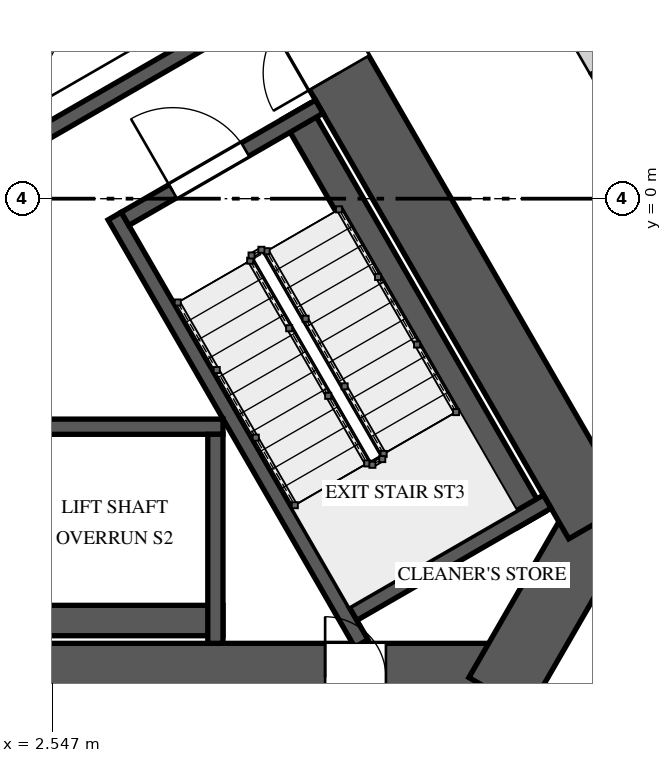
"""IFC4 building model, lengths in metres.
Left out: names, types, materials, properties, quantities, classifications, styles, units other than length and angle.
Written with IfcOpenShell. Run it as: python <this file> out.ifc"""

import sys

from ifc_helpers import new_model, si_unit, direction, frame, frame_2d, origin, place, context, subcontext, project, spatial, rectangle, extrude, element, fill, save


model = new_model("IFC4")
c1 = context("Model", 3, precision=1e-05, world=origin(), true_north=direction((0.0, 1.0)))
c2 = subcontext(c1, "Body", "Model", "MODEL_VIEW")
j1 = project(units=[si_unit("LENGTHUNIT", "METRE"), si_unit("PLANEANGLEUNIT", "RADIAN")], contexts=[c1])
p1 = place(None, origin())
s1 = spatial("IfcSite", under=j1, at=p1, CompositionType="ELEMENT")
p2 = place(p1, origin())
s2 = spatial("IfcBuilding", under=s1, at=p2, CompositionType="ELEMENT")
p3 = place(p2, frame((0.0, 0.0, 129.6)))
s3 = spatial("IfcBuildingStorey", under=s2, at=p3, CompositionType="ELEMENT", Elevation=129.6)
p4 = place(p3, frame((-8.545, -6.3, 0.0), z_axis=(0.0, 0.0, 1.0), x_axis=(1.0, 0.0, 0.0)))
e1 = element("IfcWall", 1, at=p4, inside=s3, PredefinedType="SHEAR", context=c2, shape_type="SweptSolid", body=[
    extrude(rectangle(XDim=17.09, YDim=0.9, at=frame_2d((8.545, 0.0))), origin(), (0.0, 0.0, 1.0), 4.0),
])
p5 = place(p4, frame((6.75, 0.0, 0.0)))
e2 = element("IfcOpeningElement", 2, at=p5, cuts=e1, PredefinedType="OPENING", context=c2, shape_type="SweptSolid", body=[
    extrude(rectangle(XDim=1.0, YDim=2.4, at=frame_2d((0.5, 1.2))), frame((0.0, 0.46, 0.0), z_axis=(0.0, -1.0, 0.0), x_axis=(1.0, 0.0, 0.0)), (0.0, 0.0, 1.0), 0.92),
])
p6 = place(p4, frame((14.678, 0.0, 0.0)))
e3 = element("IfcOpeningElement", 3, at=p6, cuts=e1, PredefinedType="OPENING", context=c2, shape_type="SweptSolid", body=[
    extrude(rectangle(XDim=0.8, YDim=2.1, at=frame_2d((0.4, 1.05))), frame((0.0, 0.46, 0.0), z_axis=(0.0, -1.0, 0.0), x_axis=(1.0, 0.0, 0.0)), (0.0, 0.0, 1.0), 0.92),
])
p7 = place(p3, frame((8.415, -6.525, 0.0), z_axis=(0.0, 0.0, 1.0), x_axis=(0.500059191753, 0.865991226713, 0.0)))
e4 = element("IfcWall", 4, at=p7, inside=s3, PredefinedType="SHEAR", context=c2, shape_type="SweptSolid", body=[
    extrude(rectangle(XDim=2.887, YDim=0.9, at=frame_2d((1.443, 0.0))), origin(), (0.0, 0.0, 1.0), 4.0),
])
p8 = place(p3, frame((9.729, -4.25, 0.0), z_axis=(0.0, 0.0, 1.0), x_axis=(-0.500004814304, 0.866022624227, 0.0)))
e5 = element("IfcWall", 5, at=p8, inside=s3, PredefinedType="SHEAR", context=c2, shape_type="SweptSolid", body=[
    extrude(rectangle(XDim=17.09, YDim=0.9, at=frame_2d((8.545, 0.0))), origin(), (0.0, 0.0, 1.0), 4.0),
])
p9 = place(p8, frame((6.82, 0.0, 0.0)))
e6 = element("IfcOpeningElement", 6, at=p9, cuts=e5, PredefinedType="OPENING", context=c2, shape_type="SweptSolid", body=[
    extrude(rectangle(XDim=1.0, YDim=2.4, at=frame_2d((0.5, 1.2))), frame((0.0, 0.46, 0.0), z_axis=(0.0, -1.0, 0.0), x_axis=(1.0, 0.0, 0.0)), (0.0, 0.0, 1.0), 0.92),
])
p10 = place(p3, frame((8.846, -4.222, 0.0), z_axis=(0.0, 0.0, 1.0), x_axis=(-0.500009909098, 0.866019682689, 0.0)))
e7 = element("IfcWall", 7, at=p10, inside=s3, PredefinedType="SOLIDWALL", context=c2, shape_type="SweptSolid", body=[
    extrude(rectangle(XDim=6.2, YDim=0.4, at=frame_2d((3.1, 0.0))), origin(), (0.0, 0.0, 1.0), 3.65),
])
p11 = place(p3, frame((6.611, -5.85, 0.0), z_axis=(0.0, 0.0, 1.0), x_axis=(-0.499965531574, 0.866045303225, 0.0)))
e8 = element("IfcWall", 8, at=p11, inside=s3, PredefinedType="SOLIDWALL", context=c2, shape_type="SweptSolid", body=[
    extrude(rectangle(XDim=6.492, YDim=0.2, at=frame_2d((3.246, 0.0))), origin(), (0.0, 0.0, 1.0), 3.65),
])
p12 = place(p3, frame((6.501, -5.461, 0.0), z_axis=(0.0, 0.0, 1.0), x_axis=(0.866003658127, 0.500037662692, 0.0)))
e9 = element("IfcWall", 9, at=p12, inside=s3, PredefinedType="SOLIDWALL", context=c2, shape_type="SweptSolid", body=[
    extrude(rectangle(XDim=2.95, YDim=0.2, at=frame_2d((1.475, 0.0))), origin(), (0.0, 0.0, 1.0), 3.65),
])
p13 = place(p3, frame((3.501, -0.265, 0.0), z_axis=(0.0, 0.0, 1.0), x_axis=(0.866039495442, 0.49997559174, 0.0)))
e10 = element("IfcWall", 10, at=p13, inside=s3, PredefinedType="SOLIDWALL", context=c2, shape_type="SweptSolid", body=[
    extrude(rectangle(XDim=2.95, YDim=0.2, at=frame_2d((1.475, 0.0))), origin(), (0.0, 0.0, 1.0), 3.65),
])
p14 = place(p13, frame((0.725, 0.0, 0.0)))
e11 = element("IfcOpeningElement", 11, at=p14, cuts=e10, PredefinedType="OPENING", context=c2, shape_type="SweptSolid", body=[
    extrude(rectangle(XDim=1.1, YDim=2.4, at=frame_2d((0.55, 1.2))), frame((0.0, 0.11, 0.0), z_axis=(0.0, -1.0, 0.0), x_axis=(1.0, 0.0, 0.0)), (0.0, 0.0, 1.0), 0.22),
])
p15 = place(p3, frame((-0.71, -3.0, 0.0), z_axis=(0.0, 0.0, 1.0), x_axis=(1.0, 0.0, 0.0)))
e12 = element("IfcWall", 12, at=p15, inside=s3, PredefinedType="SOLIDWALL", context=c2, shape_type="SweptSolid", body=[
    extrude(rectangle(XDim=5.5, YDim=0.2, at=frame_2d((2.75, 0.0))), origin(), (0.0, 0.0, 1.0), 3.65),
])
p16 = place(p3, frame((-0.71, -5.55, 0.0), z_axis=(0.0, 0.0, 1.0), x_axis=(1.0, 0.0, 0.0)))
e13 = element("IfcWall", 13, at=p16, inside=s3, PredefinedType="SOLIDWALL", context=c2, shape_type="SweptSolid", body=[
    extrude(rectangle(XDim=5.5, YDim=0.4, at=frame_2d((2.75, 0.0))), origin(), (0.0, 0.0, 1.0), 3.65),
])
p17 = place(p3, frame((4.69, -3.1, 0.0), z_axis=(0.0, 0.0, 1.0), x_axis=(0.0, -1.0, 0.0)))
e14 = element("IfcWall", 14, at=p17, inside=s3, PredefinedType="SOLIDWALL", context=c2, shape_type="SweptSolid", body=[
    extrude(rectangle(XDim=2.75, YDim=0.2, at=frame_2d((1.375, 0.0))), origin(), (0.0, 0.0, 1.0), 3.65),
])
p18 = place(p3, frame((2.227, 0.743, 0.0), z_axis=(0.0, 0.0, 1.0), x_axis=(0.866012656725, 0.500022077904, 0.0)))
e15 = element("IfcWall", 15, at=p18, inside=s3, PredefinedType="SOLIDWALL", context=c2, shape_type="SweptSolid", body=[
    extrude(rectangle(XDim=3.55, YDim=0.2, at=frame_2d((1.775, 0.0))), origin(), (0.0, 0.0, 1.0), 3.65),
])
p19 = place(p3, frame((9.231, 2.511, 0.0), z_axis=(0.0, 0.0, 1.0), x_axis=(0.500118100521, -0.865957207679, 0.0)))
e16 = element("IfcWall", 16, at=p19, inside=s3, PredefinedType="SOLIDWALL", context=c2, shape_type="SweptSolid", body=[
    extrude(rectangle(XDim=0.944, YDim=0.2, at=frame_2d((0.472, 0.0))), origin(), (0.0, 0.0, 1.0), 2.55),
])
p20 = place(p3, frame((9.703, 1.694, 0.0), z_axis=(0.0, 0.0, 1.0), x_axis=(0.499942357345, -0.866058681229, 0.0)))
e17 = element("IfcWall", 17, at=p20, inside=s3, PredefinedType="SOLIDWALL", context=c2, shape_type="SweptSolid", body=[
    extrude(rectangle(XDim=0.801, YDim=0.2, at=frame_2d((0.4, 0.0))), origin(), (0.0, 0.0, 1.0), 3.65),
])
p21 = place(p14, origin())
e18 = element("IfcDoor", 18, at=p21, inside=s3, OperationType="SINGLE_SWING_RIGHT", PredefinedType="DOOR", context=c2, shape_type="SweptSolid", body=[
    extrude(rectangle(XDim=1.1, YDim=2.4, at=frame_2d((0.55, 1.2))), frame((0.0, 0.025, 0.0), z_axis=(0.0, -1.0, 0.0), x_axis=(1.0, 0.0, 0.0)), (0.0, 0.0, 1.0), 0.05),
])
fill(e11, e18)
p22 = place(p9, origin())
e19 = element("IfcDoor", 19, at=p22, inside=s3, OperationType="SINGLE_SWING_RIGHT", PredefinedType="DOOR", context=c2, shape_type="SweptSolid", body=[
    extrude(rectangle(XDim=1.0, YDim=2.4, at=frame_2d((0.5, 1.2))), frame((0.0, 0.025, 0.0), z_axis=(0.0, -1.0, 0.0), x_axis=(1.0, 0.0, 0.0)), (0.0, 0.0, 1.0), 0.05),
])
fill(e6, e19)
p23 = place(p6, origin())
e20 = element("IfcDoor", 20, at=p23, inside=s3, OperationType="SINGLE_SWING_RIGHT", PredefinedType="DOOR", context=c2, shape_type="SweptSolid", body=[
    extrude(rectangle(XDim=0.8, YDim=2.1, at=frame_2d((0.4, 1.05))), frame((0.0, 0.025, 0.0), z_axis=(0.0, -1.0, 0.0), x_axis=(1.0, 0.0, 0.0)), (0.0, 0.0, 1.0), 0.05),
])
fill(e3, e20)
save(model, sys.argv[1])
